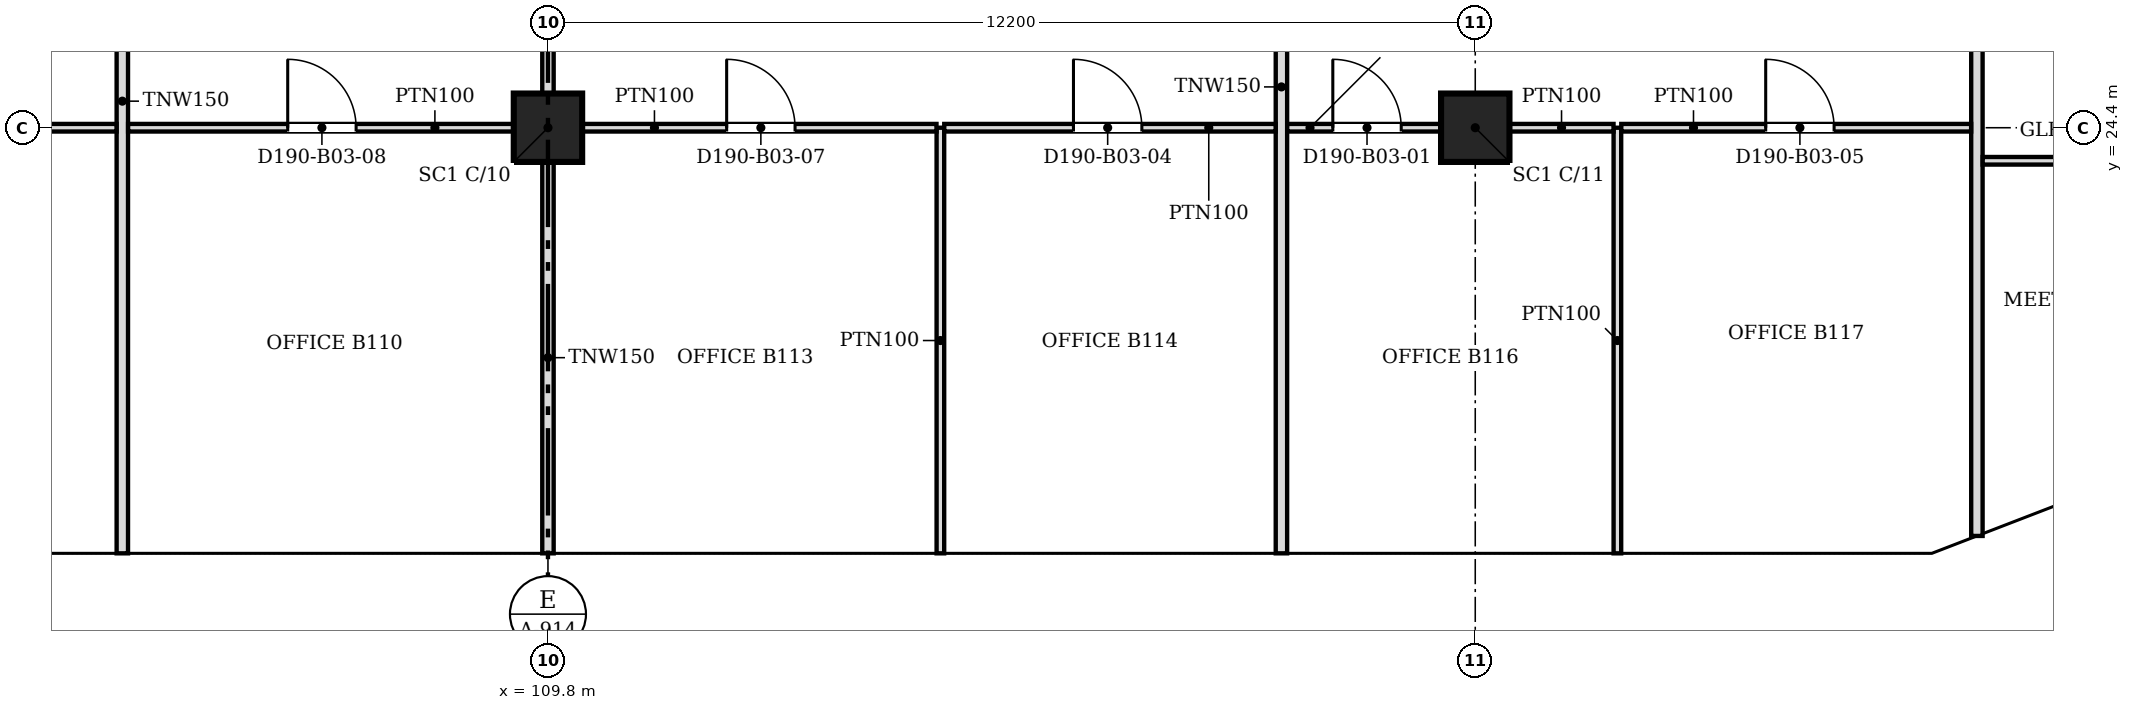
"""IFC4 building model, lengths in metres.
Left out: names, types, materials, properties, quantities, classifications, styles, units other than length and angle.
Written with IfcOpenShell. Run it as: python <this file> out.ifc"""

import sys

from ifc_helpers import new_model, si_unit, direction, frame, frame_2d, origin, origin_2d, place, context, subcontext, project, spatial, polyline, rectangle, outline, extrude, faceted_brep, source, transform, mapped, element, fill, save


model = new_model("IFC4")
c1 = context("Model", 3, precision=1e-05, world=origin(), true_north=direction((0.0, 1.0)))
c2 = subcontext(c1, "Body", "Model", "MODEL_VIEW")
j1 = project(units=[si_unit("LENGTHUNIT", "METRE"), si_unit("PLANEANGLEUNIT", "RADIAN")], contexts=[c1])
p1 = place(None, origin())
s1 = spatial("IfcSite", under=j1, at=p1, CompositionType="ELEMENT")
p2 = place(p1, origin())
s2 = spatial("IfcBuilding", under=s1, at=p2, CompositionType="ELEMENT")
p3 = place(p2, frame((0.0, 0.0, 25.8)))
s3 = spatial("IfcBuildingStorey", under=s2, at=p3, CompositionType="ELEMENT", Elevation=25.8)
for number, where, z_axis, x_axis in (
    (1, (109.8, 24.4, 0.0), (0.0, 0.0, 1.0), (1.0, 0.0, 0.0)),
    (2, (122.0, 24.4, 0.0), (0.0, 0.0, 1.0), (1.0, 0.0, 0.0)),
):
    element("IfcColumn", number, at=place(p3, frame(where, z_axis=z_axis, x_axis=x_axis)), inside=s3, PredefinedType="COLUMN", context=c2, shape_type="SweptSolid", body=[
        extrude(rectangle(XDim=0.9, YDim=0.9, at=origin_2d()), origin(), (0.0, 0.0, 1.0), 3.6),
    ])
m1 = source(origin(), c2, "Body", "SweptSolid", [
    extrude(outline(polyline([(6.1, 0.0), (3.05, 3.8), (0.0, 0.0), (6.1, 0.0)])), frame((0.0, 0.25, 0.0), z_axis=(0.0, -1.0, 0.0), x_axis=(1.0, 0.0, 0.0)), (0.0, 0.0, 1.0), 0.5),
])
p4 = place(p3, frame((100.65, 18.55, 0.0), z_axis=(0.0, 0.0, 1.0), x_axis=(1.0, 0.0, 0.0)))
e3 = element("IfcWall", 3, at=p4, inside=s3, PredefinedType="SOLIDWALL", context=c2, shape_type="MappedRepresentation", body=[
    mapped(m1, transform((0.0, 0.0, 0.0), scale=1.0)),
])
m2 = source(origin(), c2, "Body", "SweptSolid", [
    extrude(outline(polyline([(5.579, 0.25), (3.05, 3.401), (0.521, 0.25), (5.579, 0.25)])), frame((0.0, 0.26, 0.0), z_axis=(0.0, -1.0, 0.0), x_axis=(1.0, 0.0, 0.0)), (0.0, 0.0, 1.0), 0.52),
])
p5 = place(p4, origin())
e4 = element("IfcOpeningElement", 4, at=p5, cuts=e3, PredefinedType="OPENING", context=c2, shape_type="MappedRepresentation", body=[
    mapped(m2, transform((0.0, 0.0, 0.0), scale=1.0)),
])
p6 = place(p3, frame((106.75, 18.55, 0.0), z_axis=(0.0, 0.0, 1.0), x_axis=(1.0, 0.0, 0.0)))
e5 = element("IfcWall", 5, at=p6, inside=s3, PredefinedType="SOLIDWALL", context=c2, shape_type="MappedRepresentation", body=[
    mapped(m1, transform((0.0, 0.0, 0.0), scale=1.0)),
])
p7 = place(p6, origin())
e6 = element("IfcOpeningElement", 6, at=p7, cuts=e5, PredefinedType="OPENING", context=c2, shape_type="MappedRepresentation", body=[
    mapped(m2, transform((0.0, 0.0, 0.0), scale=1.0)),
])
m3 = source(origin(), c2, "Body", "Brep", [
    faceted_brep([(6.1, -0.25, 0.0), (3.05, -0.25, 3.8), (0.0, -0.25, 0.0), (6.1, -0.25, 0.0), (0.0, 0.25, 0.0), (3.05, 0.25, 3.8), (6.1, 0.25, 0.0), (6.1, 0.25, 0.0)], [[[0, 1, 2, 3]], [[4, 5, 6, 7]], [[6, 5, 1, 0]], [[5, 4, 2, 1]], [[4, 7, 3, 2]], [[3, 7, 6, 0]]]),
])
p8 = place(p3, frame((112.85, 18.55, 0.0), z_axis=(0.0, 0.0, 1.0), x_axis=(1.0, 0.0, 0.0)))
e7 = element("IfcWall", 7, at=p8, inside=s3, PredefinedType="SOLIDWALL", context=c2, shape_type="MappedRepresentation", body=[
    mapped(m3, transform((0.0, 0.0, 0.0), scale=1.0)),
])
p9 = place(p8, origin())
e8 = element("IfcOpeningElement", 8, at=p9, cuts=e7, PredefinedType="OPENING", context=c2, shape_type="MappedRepresentation", body=[
    mapped(m2, transform((0.0, 0.0, 0.0), scale=1.0)),
])
p10 = place(p3, frame((118.95, 18.55, 0.0), z_axis=(0.0, 0.0, 1.0), x_axis=(1.0, 0.0, 0.0)))
e9 = element("IfcWall", 9, at=p10, inside=s3, PredefinedType="SOLIDWALL", context=c2, shape_type="MappedRepresentation", body=[
    mapped(m1, transform((0.0, 0.0, 0.0), scale=1.0)),
])
p11 = place(p10, origin())
e10 = element("IfcOpeningElement", 10, at=p11, cuts=e9, PredefinedType="OPENING", context=c2, shape_type="MappedRepresentation", body=[
    mapped(m2, transform((0.0, 0.0, 0.0), scale=1.0)),
])
m4 = source(origin(), c2, "Body", "Brep", [
    faceted_brep([(3.05, -0.25, 3.74), (3.003, -0.25, 3.8), (0.0, -0.25, 0.0), (3.05, -0.25, 0.0), (0.0, 0.25, 0.0), (2.957, 0.25, 3.741), (2.957, 0.25, 0.0), (3.003, 0.0, 3.8)], [[[0, 1, 2, 3]], [[4, 5, 6]], [[7, 1, 0]], [[5, 4, 2, 1, 7]], [[4, 6, 3, 2]], [[3, 6, 5, 7, 0]]]),
])
p12 = place(p3, frame((125.05, 18.55, 0.0), z_axis=(0.0, 0.0, 1.0), x_axis=(1.0, 0.0, 0.0)))
e11 = element("IfcWall", 11, at=p12, inside=s3, PredefinedType="SOLIDWALL", context=c2, shape_type="MappedRepresentation", body=[
    mapped(m4, transform((0.0, 0.0, 0.0), scale=1.0)),
])
m5 = source(origin(), c2, "Body", "SweptSolid", [
    extrude(outline(polyline([(2.803, 3.144), (0.516, 0.25), (2.803, 0.25), (2.803, 3.144)])), frame((0.0, 0.26, 0.0), z_axis=(0.0, -1.0, 0.0), x_axis=(1.0, 0.0, 0.0)), (0.0, 0.0, 1.0), 0.52),
])
p13 = place(p12, origin())
e12 = element("IfcOpeningElement", 12, at=p13, cuts=e11, PredefinedType="OPENING", context=c2, shape_type="MappedRepresentation", body=[
    mapped(m5, transform((0.0, 0.0, 0.0), scale=1.0)),
])
m6 = source(origin(), c2, "Body", "Brep", [
    faceted_brep([(2.997, -0.25, 0.0), (0.047, -0.25, 3.8), (0.0, -0.25, 3.741), (0.0, -0.25, 0.0), (0.093, 0.25, 3.74), (2.944, 0.25, 0.068), (2.944, 0.25, 0.0), (0.093, 0.25, 0.0), (0.047, 0.0, 3.8), (2.997, 0.0, 0.0)], [[[0, 1, 2, 3]], [[4, 5, 6, 7]], [[5, 4, 8, 1, 0, 9]], [[2, 1, 8]], [[7, 6, 9, 0, 3]], [[7, 3, 2, 8, 4]], [[9, 6, 5]]]),
])
p14 = place(p3, frame((128.01, 18.533, 0.0), z_axis=(0.0, 0.0, 1.0), x_axis=(0.932990326376, 0.359901446078, 0.0)))
e13 = element("IfcWall", 13, at=p14, inside=s3, PredefinedType="SOLIDWALL", context=c2, shape_type="MappedRepresentation", body=[
    mapped(m6, transform((0.0, 0.0, 0.0), scale=1.0)),
])
m7 = source(origin(), c2, "Body", "SweptSolid", [
    extrude(outline(polyline([(2.487, 0.25), (0.247, 3.135), (0.247, 0.25), (2.487, 0.25)])), frame((0.0, 0.26, 0.0), z_axis=(0.0, -1.0, 0.0), x_axis=(1.0, 0.0, 0.0)), (0.0, 0.0, 1.0), 0.52),
])
p15 = place(p14, origin())
e14 = element("IfcOpeningElement", 14, at=p15, cuts=e13, PredefinedType="OPENING", context=c2, shape_type="MappedRepresentation", body=[
    mapped(m7, transform((0.0, 0.0, 0.0), scale=1.0)),
])
p16 = place(p2, frame((0.0, 0.0, 29.6)))
s4 = spatial("IfcBuildingStorey", under=s2, at=p16, CompositionType="ELEMENT", Elevation=29.6)
m8 = source(origin(), c2, "Body", "Brep", [
    faceted_brep([(3.05, -0.25, 0.0), (6.1, -0.25, 3.8), (6.1, -0.25, 3.8), (3.05, -0.25, 7.6), (0.0, -0.25, 3.8), (0.0, 0.25, 3.8), (3.05, 0.25, 7.6), (6.1, 0.25, 3.8), (6.1, 0.25, 3.8), (3.05, 0.25, 0.0)], [[[0, 1, 2, 3, 4]], [[5, 6, 7, 8, 9]], [[9, 8, 1, 0]], [[7, 6, 3, 2]], [[6, 5, 4, 3]], [[5, 9, 0, 4]], [[1, 8, 7, 2]]]),
])
p17 = place(p16, frame((97.6, 18.55, -3.8), z_axis=(0.0, 0.0, 1.0), x_axis=(1.0, 0.0, 0.0)))
e15 = element("IfcWall", 15, at=p17, inside=s4, PredefinedType="SOLIDWALL", context=c2, shape_type="MappedRepresentation", body=[
    mapped(m8, transform((0.0, 0.0, 0.0), scale=1.0)),
])
m9 = source(origin(), c2, "Body", "SweptSolid", [
    extrude(outline(polyline([(3.05, 0.399), (5.78, 3.8), (3.05, 7.2), (0.321, 3.8), (3.05, 0.399)])), frame((0.0, 0.26, 0.0), z_axis=(0.0, -1.0, 0.0), x_axis=(1.0, 0.0, 0.0)), (0.0, 0.0, 1.0), 0.52),
])
p18 = place(p17, origin())
e16 = element("IfcOpeningElement", 16, at=p18, cuts=e15, PredefinedType="OPENING", context=c2, shape_type="MappedRepresentation", body=[
    mapped(m9, transform((0.0, 0.0, 0.0), scale=1.0)),
])
m10 = source(origin(), c2, "Body", "SweptSolid", [
    extrude(outline(polyline([(3.05, 0.0), (6.1, 3.8), (3.05, 7.6), (0.0, 3.8), (3.05, 0.0)])), frame((0.0, 0.25, 0.0), z_axis=(0.0, -1.0, 0.0), x_axis=(1.0, 0.0, 0.0)), (0.0, 0.0, 1.0), 0.5),
])
p19 = place(p16, frame((103.7, 18.55, -3.8), z_axis=(0.0, 0.0, 1.0), x_axis=(1.0, 0.0, 0.0)))
e17 = element("IfcWall", 17, at=p19, inside=s4, PredefinedType="SOLIDWALL", context=c2, shape_type="MappedRepresentation", body=[
    mapped(m10, transform((0.0, 0.0, 0.0), scale=1.0)),
])
p20 = place(p19, origin())
e18 = element("IfcOpeningElement", 18, at=p20, cuts=e17, PredefinedType="OPENING", context=c2, shape_type="MappedRepresentation", body=[
    mapped(m9, transform((0.0, 0.0, 0.0), scale=1.0)),
])
p21 = place(p16, frame((109.8, 18.55, -3.8), z_axis=(0.0, 0.0, 1.0), x_axis=(1.0, 0.0, 0.0)))
e19 = element("IfcWall", 19, at=p21, inside=s4, PredefinedType="SOLIDWALL", context=c2, shape_type="MappedRepresentation", body=[
    mapped(m8, transform((0.0, 0.0, 0.0), scale=1.0)),
])
p22 = place(p21, origin())
e20 = element("IfcOpeningElement", 20, at=p22, cuts=e19, PredefinedType="OPENING", context=c2, shape_type="MappedRepresentation", body=[
    mapped(m9, transform((0.0, 0.0, 0.0), scale=1.0)),
])
p23 = place(p16, frame((115.9, 18.55, -3.8), z_axis=(0.0, 0.0, 1.0), x_axis=(1.0, 0.0, 0.0)))
e21 = element("IfcWall", 21, at=p23, inside=s4, PredefinedType="SOLIDWALL", context=c2, shape_type="MappedRepresentation", body=[
    mapped(m10, transform((0.0, 0.0, 0.0), scale=1.0)),
])
p24 = place(p23, origin())
e22 = element("IfcOpeningElement", 22, at=p24, cuts=e21, PredefinedType="OPENING", context=c2, shape_type="MappedRepresentation", body=[
    mapped(m9, transform((0.0, 0.0, 0.0), scale=1.0)),
])
m11 = source(origin(), c2, "Body", "Brep", [
    faceted_brep([(3.05, -0.25, 0.0), (6.053, -0.25, 3.8), (3.05, -0.25, 7.6), (0.0, -0.25, 3.8), (0.0, 0.25, 3.8), (3.05, 0.25, 7.6), (6.007, 0.25, 3.859), (6.007, 0.25, 3.741), (3.05, 0.25, 0.0), (6.053, 0.0, 3.8)], [[[0, 1, 2, 3]], [[4, 5, 6, 7, 8]], [[8, 7, 9, 1, 0]], [[6, 5, 2, 1, 9]], [[5, 4, 3, 2]], [[4, 8, 0, 3]], [[7, 6, 9]]]),
])
p25 = place(p16, frame((122.0, 18.55, -3.8), z_axis=(0.0, 0.0, 1.0), x_axis=(1.0, 0.0, 0.0)))
e23 = element("IfcWall", 23, at=p25, inside=s4, PredefinedType="SOLIDWALL", context=c2, shape_type="MappedRepresentation", body=[
    mapped(m11, transform((0.0, 0.0, 0.0), scale=1.0)),
])
m12 = source(origin(), c2, "Body", "SweptSolid", [
    extrude(outline(polyline([(3.049, 0.401), (5.735, 3.8), (3.049, 7.199), (0.321, 3.8), (3.049, 0.401)])), frame((0.0, 0.26, 0.0), z_axis=(0.0, -1.0, 0.0), x_axis=(1.0, 0.0, 0.0)), (0.0, 0.0, 1.0), 0.52),
])
p26 = place(p25, origin())
e24 = element("IfcOpeningElement", 24, at=p26, cuts=e23, PredefinedType="OPENING", context=c2, shape_type="MappedRepresentation", body=[
    mapped(m12, transform((0.0, 0.0, 0.0), scale=1.0)),
])
m13 = source(origin(), c2, "Body", "Brep", [
    faceted_brep([(2.95, -0.25, 0.0), (3.003, -0.25, 0.068), (3.003, -0.25, 7.531), (2.95, -0.25, 7.6), (0.0, -0.25, 3.8), (0.047, 0.25, 3.86), (2.898, 0.25, 7.532), (2.898, 0.25, 0.068), (0.047, 0.25, 3.74), (2.95, 0.0, 0.0), (2.95, 0.0, 7.6), (0.0, 0.0, 3.8)], [[[0, 1, 2, 3, 4]], [[5, 6, 7, 8]], [[1, 0, 9]], [[10, 3, 2]], [[6, 5, 11, 4, 3, 10]], [[8, 7, 9, 0, 4, 11]], [[8, 11, 5]], [[1, 9, 7, 6, 10, 2]]]),
])
p27 = place(p16, frame((128.053, 18.55, -3.8), z_axis=(0.0, 0.0, 1.0), x_axis=(0.933007896601, 0.359855894603, 0.0)))
e25 = element("IfcWall", 25, at=p27, inside=s4, PredefinedType="SOLIDWALL", context=c2, shape_type="MappedRepresentation", body=[
    mapped(m13, transform((0.0, 0.0, 0.0), scale=1.0)),
])
m14 = source(origin(), c2, "Body", "SweptSolid", [
    extrude(outline(polyline([(2.75, 6.935), (0.316, 3.8), (2.75, 0.665), (2.75, 6.935)])), frame((0.0, 0.26, 0.0), z_axis=(0.0, -1.0, 0.0), x_axis=(1.0, 0.0, 0.0)), (0.0, 0.0, 1.0), 0.52),
])
p28 = place(p27, origin())
e26 = element("IfcOpeningElement", 26, at=p28, cuts=e25, PredefinedType="OPENING", context=c2, shape_type="MappedRepresentation", body=[
    mapped(m14, transform((0.0, 0.0, 0.0), scale=1.0)),
])
p29 = place(p3, frame((104.2, 18.8, 0.0), z_axis=(0.0, 0.0, 1.0), x_axis=(0.0, 1.0, 0.0)))
e27 = element("IfcWall", 27, at=p29, inside=s3, PredefinedType="PARTITIONING", context=c2, shape_type="SweptSolid", body=[
    extrude(rectangle(XDim=11.899, YDim=0.15, at=frame_2d((5.949, 0.0))), origin(), (0.0, 0.0, 1.0), 3.067),
])
p30 = place(p3, frame((109.8, 18.8, 0.0), z_axis=(0.0, 0.0, 1.0), x_axis=(0.0, 1.0, 0.0)))
e28 = element("IfcWall", 28, at=p30, inside=s3, PredefinedType="PARTITIONING", context=c2, shape_type="SweptSolid", body=[
    extrude(rectangle(XDim=5.149, YDim=0.15, at=frame_2d((2.574, 0.0))), origin(), (0.0, 0.0, 1.0), 3.067),
])
p31 = place(p3, frame((114.963, 18.8, 0.0), z_axis=(0.0, 0.0, 1.0), x_axis=(0.0, 1.0, 0.0)))
e29 = element("IfcWall", 29, at=p31, inside=s3, PredefinedType="PARTITIONING", context=c2, shape_type="SweptSolid", body=[
    extrude(rectangle(XDim=5.6, YDim=0.1, at=frame_2d((2.8, 0.0))), origin(), (0.0, 0.0, 1.0), 3.067),
])
p32 = place(p3, frame((119.45, 18.8, 0.0), z_axis=(0.0, 0.0, 1.0), x_axis=(0.0, 1.0, 0.0)))
e30 = element("IfcWall", 30, at=p32, inside=s3, PredefinedType="PARTITIONING", context=c2, shape_type="SweptSolid", body=[
    extrude(rectangle(XDim=12.274, YDim=0.15, at=frame_2d((6.137, 0.0))), origin(), (0.0, 0.0, 1.0), 3.067),
])
p33 = place(p3, frame((123.87, 18.8, 0.0), z_axis=(0.0, 0.0, 1.0), x_axis=(0.0, 1.0, 0.0)))
e31 = element("IfcWall", 31, at=p33, inside=s3, PredefinedType="PARTITIONING", context=c2, shape_type="SweptSolid", body=[
    extrude(rectangle(XDim=5.6, YDim=0.1, at=frame_2d((2.8, 0.0))), origin(), (0.0, 0.0, 1.0), 3.067),
])
p34 = place(p3, frame((128.6, 19.029, 0.0), z_axis=(0.0, 0.0, 1.0), x_axis=(0.0, 1.0, 0.0)))
e32 = element("IfcWall", 32, at=p34, inside=s3, PredefinedType="PARTITIONING", context=c2, shape_type="SweptSolid", body=[
    extrude(rectangle(XDim=15.095, YDim=0.15, at=frame_2d((7.548, 0.0))), origin(), (0.0, 0.0, 1.0), 3.067),
])
p35 = place(p3, frame((133.496, 23.965, 0.0), z_axis=(0.0, 0.0, 1.0), x_axis=(-1.0, 0.0, 0.0)))
e33 = element("IfcWall", 33, at=p35, inside=s3, PredefinedType="PARTITIONING", context=c2, shape_type="SweptSolid", body=[
    extrude(rectangle(XDim=4.82, YDim=0.1, at=frame_2d((2.41, 0.0))), origin(), (0.0, 0.0, 1.0), 3.067),
])
m15 = source(origin(), c2, "Body", "SweptSolid", [
    extrude(rectangle(XDim=0.9, YDim=2.1, at=frame_2d((0.45, 1.05))), frame((0.0, 0.06, 0.0), z_axis=(0.0, -1.0, 0.0), x_axis=(1.0, 0.0, 0.0)), (0.0, 0.0, 1.0), 0.12),
])
p36 = place(p35, frame((1.92, 0.0, 0.0)))
e34 = element("IfcOpeningElement", 34, at=p36, cuts=e33, PredefinedType="OPENING", context=c2, shape_type="MappedRepresentation", body=[
    mapped(m15, transform((0.0, 0.0, 0.0), scale=1.0)),
])
p37 = place(p3, frame((104.124, 24.4, 0.0), z_axis=(0.0, 0.0, 1.0), x_axis=(-1.0, 0.0, 0.0)))
e35 = element("IfcWall", 35, at=p37, inside=s3, PredefinedType="PARTITIONING", context=c2, shape_type="SweptSolid", body=[
    extrude(rectangle(XDim=6.073, YDim=0.1, at=frame_2d((3.037, 0.0))), origin(), (0.0, 0.0, 1.0), 3.067),
])
p38 = place(p37, frame((2.396, 0.0, 0.0)))
e36 = element("IfcOpeningElement", 36, at=p38, cuts=e35, PredefinedType="OPENING", context=c2, shape_type="MappedRepresentation", body=[
    mapped(m15, transform((0.0, 0.0, 0.0), scale=1.0)),
])
p39 = place(p3, frame((109.349, 24.4, 0.0), z_axis=(0.0, 0.0, 1.0), x_axis=(-1.0, 0.0, 0.0)))
e37 = element("IfcWall", 37, at=p39, inside=s3, PredefinedType="PARTITIONING", context=c2, shape_type="SweptSolid", body=[
    extrude(rectangle(XDim=5.073, YDim=0.1, at=frame_2d((2.537, 0.0))), origin(), (0.0, 0.0, 1.0), 3.067),
])
p40 = place(p39, frame((2.073, 0.0, 0.0)))
e38 = element("IfcOpeningElement", 38, at=p40, cuts=e37, PredefinedType="OPENING", context=c2, shape_type="MappedRepresentation", body=[
    mapped(m15, transform((0.0, 0.0, 0.0), scale=1.0)),
])
p41 = place(p3, frame((114.912, 24.4, 0.0), z_axis=(0.0, 0.0, 1.0), x_axis=(-1.0, 0.0, 0.0)))
e39 = element("IfcWall", 39, at=p41, inside=s3, PredefinedType="PARTITIONING", context=c2, shape_type="SweptSolid", body=[
    extrude(rectangle(XDim=4.661, YDim=0.1, at=frame_2d((2.33, 0.0))), origin(), (0.0, 0.0, 1.0), 3.067),
])
p42 = place(p41, frame((1.861, 0.0, 0.0)))
e40 = element("IfcOpeningElement", 40, at=p42, cuts=e39, PredefinedType="OPENING", context=c2, shape_type="MappedRepresentation", body=[
    mapped(m15, transform((0.0, 0.0, 0.0), scale=1.0)),
])
p43 = place(p3, frame((119.374, 24.4, 0.0), z_axis=(0.0, 0.0, 1.0), x_axis=(-1.0, 0.0, 0.0)))
e41 = element("IfcWall", 41, at=p43, inside=s3, PredefinedType="PARTITIONING", context=c2, shape_type="SweptSolid", body=[
    extrude(rectangle(XDim=4.36, YDim=0.1, at=frame_2d((2.18, 0.0))), origin(), (0.0, 0.0, 1.0), 3.067),
])
p44 = place(p43, frame((1.76, 0.0, 0.0)))
e42 = element("IfcOpeningElement", 42, at=p44, cuts=e41, PredefinedType="OPENING", context=c2, shape_type="MappedRepresentation", body=[
    mapped(m15, transform((0.0, 0.0, 0.0), scale=1.0)),
])
p45 = place(p3, frame((121.549, 24.4, 0.0), z_axis=(0.0, 0.0, 1.0), x_axis=(-1.0, 0.0, 0.0)))
e43 = element("IfcWall", 43, at=p45, inside=s3, PredefinedType="PARTITIONING", context=c2, shape_type="SweptSolid", body=[
    extrude(rectangle(XDim=2.023, YDim=0.1, at=frame_2d((1.012, 0.0))), origin(), (0.0, 0.0, 1.0), 3.067),
])
p46 = place(p45, frame((0.523, 0.0, 0.0)))
e44 = element("IfcOpeningElement", 44, at=p46, cuts=e43, PredefinedType="OPENING", context=c2, shape_type="MappedRepresentation", body=[
    mapped(m15, transform((0.0, 0.0, 0.0), scale=1.0)),
])
p47 = place(p3, frame((122.451, 24.4, 0.0), z_axis=(0.0, 0.0, 1.0), x_axis=(1.0, 0.0, 0.0)))
e45 = element("IfcWall", 45, at=p47, inside=s3, PredefinedType="PARTITIONING", context=c2, shape_type="SweptSolid", body=[
    extrude(rectangle(XDim=1.368, YDim=0.1, at=frame_2d((0.684, 0.0))), origin(), (0.0, 0.0, 1.0), 3.067),
])
p48 = place(p3, frame((128.524, 24.4, 0.0), z_axis=(0.0, 0.0, 1.0), x_axis=(-1.0, 0.0, 0.0)))
e46 = element("IfcWall", 46, at=p48, inside=s3, PredefinedType="PARTITIONING", context=c2, shape_type="SweptSolid", body=[
    extrude(rectangle(XDim=4.603, YDim=0.1, at=frame_2d((2.301, 0.0))), origin(), (0.0, 0.0, 1.0), 3.067),
])
p49 = place(p48, frame((1.803, 0.0, 0.0)))
e47 = element("IfcOpeningElement", 47, at=p49, cuts=e46, PredefinedType="OPENING", context=c2, shape_type="MappedRepresentation", body=[
    mapped(m15, transform((0.0, 0.0, 0.0), scale=1.0)),
])
p50 = place(p3, frame((109.8, 24.851, 0.0), z_axis=(0.0, 0.0, 1.0), x_axis=(0.0, 1.0, 0.0)))
e48 = element("IfcWall", 48, at=p50, inside=s3, PredefinedType="PARTITIONING", context=c2, shape_type="SweptSolid", body=[
    extrude(rectangle(XDim=6.223, YDim=0.15, at=frame_2d((3.111, 0.0))), origin(), (0.0, 0.0, 1.0), 3.067),
])
m16 = source(origin(), c2, "Body", "SweptSolid", [
    extrude(rectangle(XDim=0.9, YDim=2.1, at=frame_2d((0.45, 1.05))), frame((0.0, 0.025, 0.0), z_axis=(0.0, -1.0, 0.0), x_axis=(1.0, 0.0, 0.0)), (0.0, 0.0, 1.0), 0.05),
])
p51 = place(p46, origin())
e49 = element("IfcDoor", 49, at=p51, inside=s3, OperationType="SINGLE_SWING_RIGHT", PredefinedType="DOOR", context=c2, shape_type="MappedRepresentation", body=[
    mapped(m16, transform((0.0, 0.0, 0.0), scale=1.0)),
])
fill(e44, e49)
p52 = place(p44, origin())
e50 = element("IfcDoor", 50, at=p52, inside=s3, OperationType="SINGLE_SWING_RIGHT", PredefinedType="DOOR", context=c2, shape_type="MappedRepresentation", body=[
    mapped(m16, transform((0.0, 0.0, 0.0), scale=1.0)),
])
fill(e42, e50)
p53 = place(p49, origin())
e51 = element("IfcDoor", 51, at=p53, inside=s3, OperationType="SINGLE_SWING_RIGHT", PredefinedType="DOOR", context=c2, shape_type="MappedRepresentation", body=[
    mapped(m16, transform((0.0, 0.0, 0.0), scale=1.0)),
])
fill(e47, e51)
p54 = place(p42, origin())
e52 = element("IfcDoor", 52, at=p54, inside=s3, OperationType="SINGLE_SWING_RIGHT", PredefinedType="DOOR", context=c2, shape_type="MappedRepresentation", body=[
    mapped(m16, transform((0.0, 0.0, 0.0), scale=1.0)),
])
fill(e40, e52)
p55 = place(p40, origin())
e53 = element("IfcDoor", 53, at=p55, inside=s3, OperationType="SINGLE_SWING_RIGHT", PredefinedType="DOOR", context=c2, shape_type="MappedRepresentation", body=[
    mapped(m16, transform((0.0, 0.0, 0.0), scale=1.0)),
])
fill(e38, e53)
save(model, sys.argv[1])
